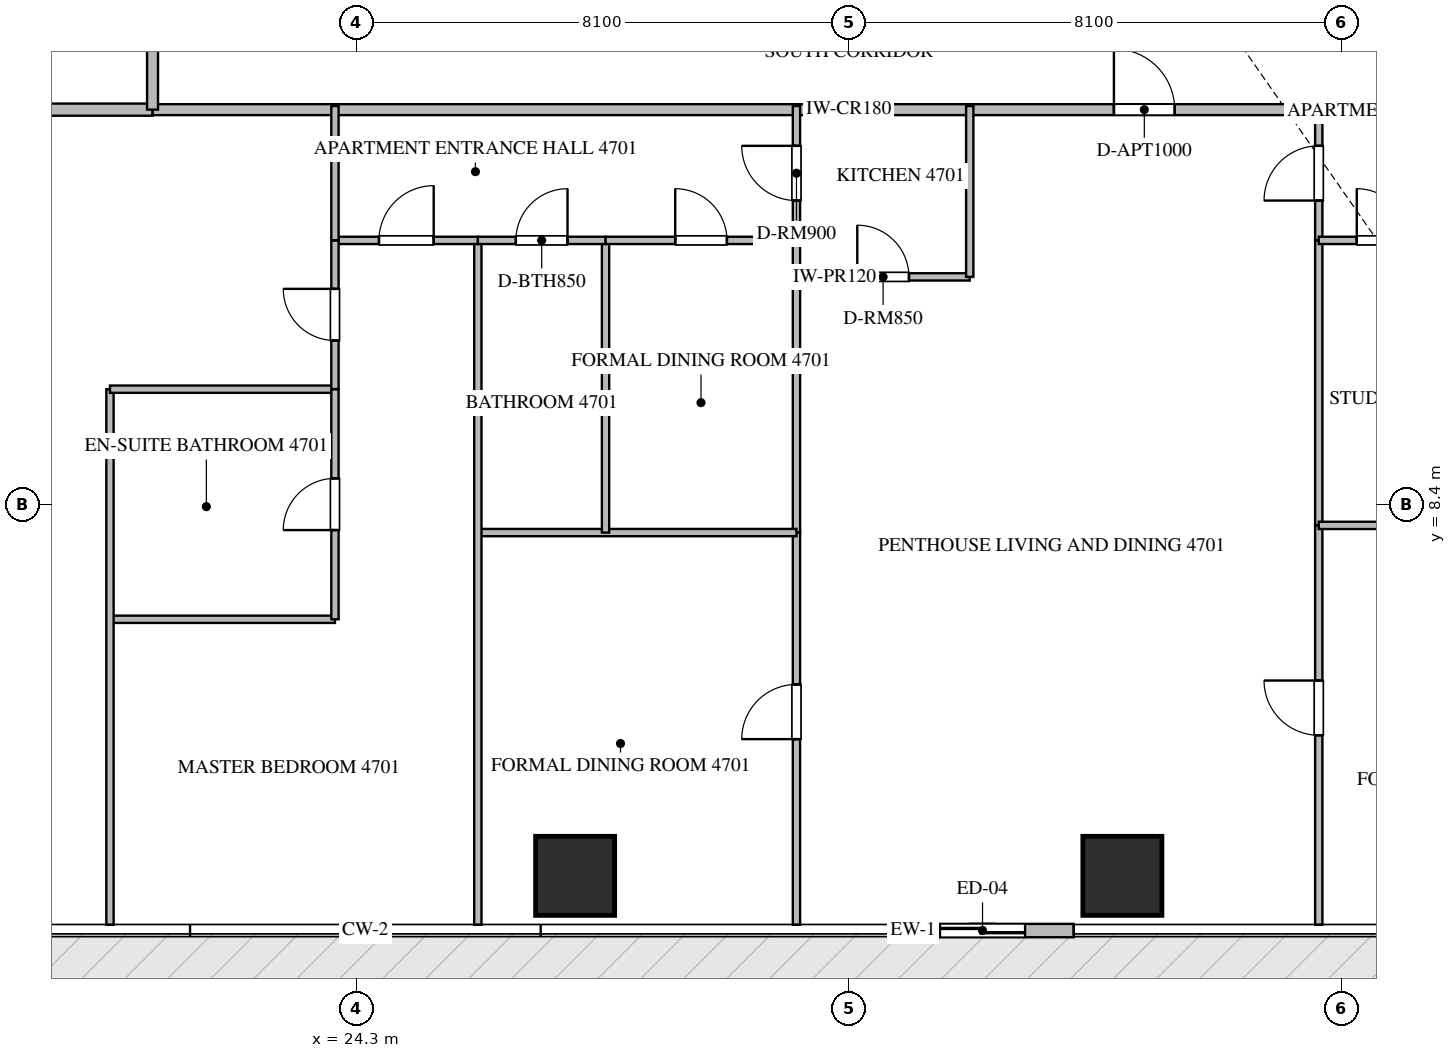
"""IFC4 building model, lengths in metres.
Left out: names, types, materials, properties, quantities, classifications, styles, units other than length and angle.
Written with IfcOpenShell. Run it as: python <this file> out.ifc"""

import sys

from ifc_helpers import new_model, si_unit, direction, frame, frame_2d, origin, origin_2d, place, context, subcontext, project, spatial, rectangle, extrude, source, transform, mapped, element, fill, save


model = new_model("IFC4")
c1 = context("Model", 3, precision=1e-05, world=origin(), true_north=direction((0.0, 1.0)))
c2 = subcontext(c1, "Body", "Model", "MODEL_VIEW")
j1 = project(units=[si_unit("LENGTHUNIT", "METRE"), si_unit("PLANEANGLEUNIT", "RADIAN")], contexts=[c1])
p1 = place(None, origin())
s1 = spatial("IfcSite", under=j1, at=p1, CompositionType="ELEMENT")
p2 = place(p1, origin())
s2 = spatial("IfcBuilding", under=s1, at=p2, CompositionType="ELEMENT")
p3 = place(p2, frame((0.0, 0.0, 187.65)))
s3 = spatial("IfcBuildingStorey", under=s2, at=p3, CompositionType="ELEMENT", Elevation=187.65)
m1 = source(origin(), c2, "Body", "SweptSolid", [
    extrude(rectangle(XDim=1.3, YDim=1.3, at=origin_2d()), origin(), (0.0, 0.0, 1.0), 3.75),
])
for number, where, z_axis, x_axis in (
    (1, (27.9, 2.3, -0.26), (0.0, 0.0, 1.0), (1.0, 0.0, 0.0)),
    (2, (36.9, 2.3, -0.26), (0.0, 0.0, 1.0), (1.0, 0.0, 0.0)),
):
    element("IfcColumn", number, at=place(p3, frame(where, z_axis=z_axis, x_axis=x_axis)), inside=s3, PredefinedType="COLUMN", context=c2, shape_type="MappedRepresentation", body=[
        mapped(m1, transform((0.0, 0.0, 0.0), scale=1.0)),
    ])
p4 = place(p3, frame((33.1, 1.4, 0.0), z_axis=(0.0, 0.0, 1.0), x_axis=(1.0, 0.0, 0.0)))
e3 = element("IfcWall", 3, at=p4, inside=s3, PredefinedType="ELEMENTEDWALL", context=c2, shape_type="SweptSolid", body=[
    extrude(rectangle(XDim=3.0, YDim=0.22, at=frame_2d((1.5, 0.0))), origin(), (0.0, 0.0, 1.0), 3.475),
])
p5 = place(p4, frame((0.8, 0.0, 0.0)))
e4 = element("IfcOpeningElement", 4, at=p5, cuts=e3, PredefinedType="OPENING", context=c2, shape_type="SweptSolid", body=[
    extrude(rectangle(XDim=1.4, YDim=2.25, at=frame_2d((0.7, 1.125))), frame((0.0, 0.12, 0.0), z_axis=(0.0, -1.0, 0.0), x_axis=(1.0, 0.0, 0.0)), (0.0, 0.0, 1.0), 0.24),
])
p6 = place(p3, frame((7.882, 14.9, 0.0), z_axis=(0.0, 0.0, 1.0), x_axis=(1.0, 0.0, 0.0)))
e5 = element("IfcWall", 5, at=p6, inside=s3, PredefinedType="PARTITIONING", context=c2, shape_type="SweptSolid", body=[
    extrude(rectangle(XDim=13.068, YDim=0.2, at=frame_2d((6.534, 0.0))), origin(), (0.0, 0.0, 1.0), 3.49),
])
p7 = place(p3, frame((20.952, 14.9, 0.0), z_axis=(0.0, 0.0, 1.0), x_axis=(1.0, 0.0, 0.0)))
e6 = element("IfcWall", 6, at=p7, inside=s3, PredefinedType="PARTITIONING", context=c2, shape_type="SweptSolid", body=[
    extrude(rectangle(XDim=22.896, YDim=0.18, at=frame_2d((11.448, 0.0))), origin(), (0.0, 0.0, 1.0), 3.49),
])
p8 = place(p7, frame((15.809, 0.0, 0.0)))
e7 = element("IfcOpeningElement", 7, at=p8, cuts=e6, PredefinedType="OPENING", context=c2, shape_type="SweptSolid", body=[
    extrude(rectangle(XDim=1.0, YDim=2.15, at=frame_2d((0.5, 1.075))), frame((0.0, 0.1, 0.0), z_axis=(0.0, -1.0, 0.0), x_axis=(1.0, 0.0, 0.0)), (0.0, 0.0, 1.0), 0.2),
])
p9 = place(p3, frame((20.95, 14.9, 0.0), z_axis=(0.0, 0.0, 1.0), x_axis=(0.0, 1.0, 0.0)))
e8 = element("IfcWall", 8, at=p9, inside=s3, PredefinedType="PARTITIONING", context=c2, shape_type="SweptSolid", body=[
    extrude(rectangle(XDim=18.7, YDim=0.18, at=frame_2d((9.35, 0.0))), origin(), (0.0, 0.0, 1.0), 3.49),
])
p10 = place(p9, frame((1.805, 0.0, 0.0)))
e9 = element("IfcOpeningElement", 9, at=p10, cuts=e8, PredefinedType="OPENING", context=c2, shape_type="SweptSolid", body=[
    extrude(rectangle(XDim=1.0, YDim=2.15, at=frame_2d((0.5, 1.075))), frame((0.0, 0.1, 0.0), z_axis=(0.0, -1.0, 0.0), x_axis=(1.0, 0.0, 0.0)), (0.0, 0.0, 1.0), 0.2),
])
p11 = place(p3, frame((31.54, 12.15, 0.0), z_axis=(0.0, 0.0, 1.0), x_axis=(1.0, 0.0, 0.0)))
e10 = element("IfcWall", 10, at=p11, inside=s3, PredefinedType="PARTITIONING", context=c2, shape_type="SweptSolid", body=[
    extrude(rectangle(XDim=2.85, YDim=0.12, at=frame_2d((1.425, 0.0))), origin(), (0.0, 0.0, 1.0), 3.49),
])
p12 = place(p11, frame((1.0, 0.0, 0.0)))
e11 = element("IfcOpeningElement", 11, at=p12, cuts=e10, PredefinedType="OPENING", context=c2, shape_type="SweptSolid", body=[
    extrude(rectangle(XDim=0.85, YDim=2.1, at=frame_2d((0.425, 1.05))), frame((0.0, 0.07, 0.0), z_axis=(0.0, -1.0, 0.0), x_axis=(1.0, 0.0, 0.0)), (0.0, 0.0, 1.0), 0.14),
])
p13 = place(p3, frame((34.39, 12.15, 0.0), z_axis=(0.0, 0.0, 1.0), x_axis=(0.0, 1.0, 0.0)))
e12 = element("IfcWall", 12, at=p13, inside=s3, PredefinedType="PARTITIONING", context=c2, shape_type="SweptSolid", body=[
    extrude(rectangle(XDim=2.81, YDim=0.12, at=frame_2d((1.405, 0.0))), origin(), (0.0, 0.0, 1.0), 3.49),
])
p14 = place(p3, frame((31.54, 12.75, 0.0), z_axis=(0.0, 0.0, 1.0), x_axis=(0.0, 1.0, 0.0)))
e13 = element("IfcWall", 13, at=p14, inside=s3, PredefinedType="PARTITIONING", context=c2, shape_type="SweptSolid", body=[
    extrude(rectangle(XDim=2.21, YDim=0.12, at=frame_2d((1.105, 0.0))), origin(), (0.0, 0.0, 1.0), 3.49),
])
p15 = place(p14, frame((0.655, 0.0, 0.0)))
e14 = element("IfcOpeningElement", 14, at=p15, cuts=e13, PredefinedType="OPENING", context=c2, shape_type="SweptSolid", body=[
    extrude(rectangle(XDim=0.9, YDim=2.1, at=frame_2d((0.45, 1.05))), frame((0.0, 0.07, 0.0), z_axis=(0.0, -1.0, 0.0), x_axis=(1.0, 0.0, 0.0)), (0.0, 0.0, 1.0), 0.14),
])
p16 = place(p3, frame((31.54, 1.495, 0.0), z_axis=(0.0, 0.0, 1.0), x_axis=(0.0, 1.0, 0.0)))
e15 = element("IfcWall", 15, at=p16, inside=s3, PredefinedType="PARTITIONING", context=c2, shape_type="SweptSolid", body=[
    extrude(rectangle(XDim=6.45, YDim=0.12, at=frame_2d((3.225, 0.0))), origin(), (0.0, 0.0, 1.0), 3.49),
])
p17 = place(p16, frame((3.053, 0.0, 0.0)))
e16 = element("IfcOpeningElement", 16, at=p17, cuts=e15, PredefinedType="OPENING", context=c2, shape_type="SweptSolid", body=[
    extrude(rectangle(XDim=0.9, YDim=2.1, at=frame_2d((0.45, 1.05))), frame((0.0, 0.07, 0.0), z_axis=(0.0, -1.0, 0.0), x_axis=(1.0, 0.0, 0.0)), (0.0, 0.0, 1.0), 0.14),
])
p18 = place(p3, frame((31.54, 7.947, 0.0), z_axis=(0.0, 0.0, 1.0), x_axis=(0.0, 1.0, 0.0)))
e17 = element("IfcWall", 17, at=p18, inside=s3, PredefinedType="PARTITIONING", context=c2, shape_type="SweptSolid", body=[
    extrude(rectangle(XDim=4.801, YDim=0.12, at=frame_2d((2.4, 0.0))), origin(), (0.0, 0.0, 1.0), 3.49),
])
p19 = place(p3, frame((26.3, 7.945, 0.0), z_axis=(0.0, 0.0, 1.0), x_axis=(1.0, 0.0, 0.0)))
e18 = element("IfcWall", 18, at=p19, inside=s3, PredefinedType="PARTITIONING", context=c2, shape_type="SweptSolid", body=[
    extrude(rectangle(XDim=5.24, YDim=0.12, at=frame_2d((2.62, 0.0))), origin(), (0.0, 0.0, 1.0), 3.49),
])
p20 = place(p3, frame((26.3, 1.495, 0.0), z_axis=(0.0, 0.0, 1.0), x_axis=(0.0, 1.0, 0.0)))
e19 = element("IfcWall", 19, at=p20, inside=s3, PredefinedType="PARTITIONING", context=c2, shape_type="SweptSolid", body=[
    extrude(rectangle(XDim=11.255, YDim=0.12, at=frame_2d((5.627, 0.0))), origin(), (0.0, 0.0, 1.0), 3.49),
])
p21 = place(p3, frame((28.4, 7.945, 0.0), z_axis=(0.0, 0.0, 1.0), x_axis=(0.0, 1.0, 0.0)))
e20 = element("IfcWall", 20, at=p21, inside=s3, PredefinedType="PARTITIONING", context=c2, shape_type="SweptSolid", body=[
    extrude(rectangle(XDim=4.805, YDim=0.12, at=frame_2d((2.402, 0.0))), origin(), (0.0, 0.0, 1.0), 3.49),
])
p22 = place(p3, frame((26.3, 12.75, 0.0), z_axis=(0.0, 0.0, 1.0), x_axis=(1.0, 0.0, 0.0)))
e21 = element("IfcWall", 21, at=p22, inside=s3, PredefinedType="PARTITIONING", context=c2, shape_type="SweptSolid", body=[
    extrude(rectangle(XDim=2.1, YDim=0.12, at=frame_2d((1.05, 0.0))), origin(), (0.0, 0.0, 1.0), 3.49),
])
p23 = place(p22, frame((0.625, 0.0, 0.0)))
e22 = element("IfcOpeningElement", 22, at=p23, cuts=e21, PredefinedType="OPENING", context=c2, shape_type="SweptSolid", body=[
    extrude(rectangle(XDim=0.85, YDim=2.1, at=frame_2d((0.425, 1.05))), frame((0.0, 0.07, 0.0), z_axis=(0.0, -1.0, 0.0), x_axis=(1.0, 0.0, 0.0)), (0.0, 0.0, 1.0), 0.14),
])
p24 = place(p3, frame((28.402, 12.75, 0.0), z_axis=(0.0, 0.0, 1.0), x_axis=(1.0, 0.0, 0.0)))
e23 = element("IfcWall", 23, at=p24, inside=s3, PredefinedType="PARTITIONING", context=c2, shape_type="SweptSolid", body=[
    extrude(rectangle(XDim=3.138, YDim=0.12, at=frame_2d((1.569, 0.0))), origin(), (0.0, 0.0, 1.0), 3.49),
])
p25 = place(p24, frame((1.144, 0.0, 0.0)))
e24 = element("IfcOpeningElement", 24, at=p25, cuts=e23, PredefinedType="OPENING", context=c2, shape_type="SweptSolid", body=[
    extrude(rectangle(XDim=0.85, YDim=2.1, at=frame_2d((0.425, 1.05))), frame((0.0, 0.07, 0.0), z_axis=(0.0, -1.0, 0.0), x_axis=(1.0, 0.0, 0.0)), (0.0, 0.0, 1.0), 0.14),
])
p26 = place(p3, frame((23.95, 12.75, 0.0), z_axis=(0.0, 0.0, 1.0), x_axis=(1.0, 0.0, 0.0)))
e25 = element("IfcWall", 25, at=p26, inside=s3, PredefinedType="PARTITIONING", context=c2, shape_type="SweptSolid", body=[
    extrude(rectangle(XDim=2.348, YDim=0.12, at=frame_2d((1.174, 0.0))), origin(), (0.0, 0.0, 1.0), 3.49),
])
p27 = place(p26, frame((0.724, 0.0, 0.0)))
e26 = element("IfcOpeningElement", 26, at=p27, cuts=e25, PredefinedType="OPENING", context=c2, shape_type="SweptSolid", body=[
    extrude(rectangle(XDim=0.9, YDim=2.1, at=frame_2d((0.45, 1.05))), frame((0.0, 0.07, 0.0), z_axis=(0.0, -1.0, 0.0), x_axis=(1.0, 0.0, 0.0)), (0.0, 0.0, 1.0), 0.14),
])
p28 = place(p3, frame((20.25, 6.519, 0.0), z_axis=(0.0, 0.0, 1.0), x_axis=(1.0, 0.0, 0.0)))
e27 = element("IfcWall", 27, at=p28, inside=s3, PredefinedType="PARTITIONING", context=c2, shape_type="SweptSolid", body=[
    extrude(rectangle(XDim=3.7, YDim=0.12, at=frame_2d((1.85, 0.0))), origin(), (0.0, 0.0, 1.0), 3.49),
])
p29 = place(p3, frame((20.25, 1.495, 0.0), z_axis=(0.0, 0.0, 1.0), x_axis=(0.0, 1.0, 0.0)))
e28 = element("IfcWall", 28, at=p29, inside=s3, PredefinedType="PARTITIONING", context=c2, shape_type="SweptSolid", body=[
    extrude(rectangle(XDim=8.808, YDim=0.12, at=frame_2d((4.404, 0.0))), origin(), (0.0, 0.0, 1.0), 3.49),
])
p30 = place(p3, frame((20.25, 10.303, 0.0), z_axis=(0.0, 0.0, 1.0), x_axis=(1.0, 0.0, 0.0)))
e29 = element("IfcWall", 29, at=p30, inside=s3, PredefinedType="PARTITIONING", context=c2, shape_type="SweptSolid", body=[
    extrude(rectangle(XDim=3.7, YDim=0.12, at=frame_2d((1.85, 0.0))), origin(), (0.0, 0.0, 1.0), 2.972),
])
p31 = place(p3, frame((23.95, 6.519, 0.0), z_axis=(0.0, 0.0, 1.0), x_axis=(0.0, 1.0, 0.0)))
e30 = element("IfcWall", 30, at=p31, inside=s3, PredefinedType="PARTITIONING", context=c2, shape_type="SweptSolid", body=[
    extrude(rectangle(XDim=3.784, YDim=0.12, at=frame_2d((1.892, 0.0))), origin(), (0.0, 0.0, 1.0), 3.49),
])
p32 = place(p31, frame((1.467, 0.0, 0.0)))
e31 = element("IfcOpeningElement", 31, at=p32, cuts=e30, PredefinedType="OPENING", context=c2, shape_type="SweptSolid", body=[
    extrude(rectangle(XDim=0.85, YDim=2.1, at=frame_2d((0.425, 1.05))), frame((0.0, 0.07, 0.0), z_axis=(0.0, -1.0, 0.0), x_axis=(1.0, 0.0, 0.0)), (0.0, 0.0, 1.0), 0.14),
])
p33 = place(p3, frame((23.95, 10.305, 0.0), z_axis=(0.0, 0.0, 1.0), x_axis=(0.0, 1.0, 0.0)))
e32 = element("IfcWall", 32, at=p33, inside=s3, PredefinedType="PARTITIONING", context=c2, shape_type="SweptSolid", body=[
    extrude(rectangle(XDim=2.445, YDim=0.12, at=frame_2d((1.223, 0.0))), origin(), (0.0, 0.0, 1.0), 3.49),
])
p34 = place(p33, frame((0.798, 0.0, 0.0)))
e33 = element("IfcOpeningElement", 33, at=p34, cuts=e32, PredefinedType="OPENING", context=c2, shape_type="SweptSolid", body=[
    extrude(rectangle(XDim=0.85, YDim=2.1, at=frame_2d((0.425, 1.05))), frame((0.0, 0.07, 0.0), z_axis=(0.0, -1.0, 0.0), x_axis=(1.0, 0.0, 0.0)), (0.0, 0.0, 1.0), 0.14),
])
p35 = place(p3, frame((23.95, 12.752, 0.0), z_axis=(0.0, 0.0, 1.0), x_axis=(0.0, 1.0, 0.0)))
e34 = element("IfcWall", 34, at=p35, inside=s3, PredefinedType="PARTITIONING", context=c2, shape_type="SweptSolid", body=[
    extrude(rectangle(XDim=2.208, YDim=0.12, at=frame_2d((1.104, 0.0))), origin(), (0.0, 0.0, 1.0), 3.49),
])
p36 = place(p3, frame((40.13, 12.75, 0.0), z_axis=(0.0, 0.0, 1.0), x_axis=(0.0, 1.0, 0.0)))
e35 = element("IfcWall", 35, at=p36, inside=s3, PredefinedType="PARTITIONING", context=c2, shape_type="SweptSolid", body=[
    extrude(rectangle(XDim=2.21, YDim=0.12, at=frame_2d((1.105, 0.0))), origin(), (0.0, 0.0, 1.0), 3.49),
])
p37 = place(p36, frame((0.655, 0.0, 0.0)))
e36 = element("IfcOpeningElement", 36, at=p37, cuts=e35, PredefinedType="OPENING", context=c2, shape_type="SweptSolid", body=[
    extrude(rectangle(XDim=0.9, YDim=2.1, at=frame_2d((0.45, 1.05))), frame((0.0, 0.07, 0.0), z_axis=(0.0, -1.0, 0.0), x_axis=(1.0, 0.0, 0.0)), (0.0, 0.0, 1.0), 0.14),
])
p38 = place(p3, frame((40.13, 1.495, 0.0), z_axis=(0.0, 0.0, 1.0), x_axis=(0.0, 1.0, 0.0)))
e37 = element("IfcWall", 37, at=p38, inside=s3, PredefinedType="PARTITIONING", context=c2, shape_type="SweptSolid", body=[
    extrude(rectangle(XDim=6.568, YDim=0.12, at=frame_2d((3.284, 0.0))), origin(), (0.0, 0.0, 1.0), 3.49),
])
p39 = place(p38, frame((3.117, 0.0, 0.0)))
e38 = element("IfcOpeningElement", 38, at=p39, cuts=e37, PredefinedType="OPENING", context=c2, shape_type="SweptSolid", body=[
    extrude(rectangle(XDim=0.9, YDim=2.1, at=frame_2d((0.45, 1.05))), frame((0.0, 0.07, 0.0), z_axis=(0.0, -1.0, 0.0), x_axis=(1.0, 0.0, 0.0)), (0.0, 0.0, 1.0), 0.14),
])
p40 = place(p3, frame((40.13, 8.065, 0.0), z_axis=(0.0, 0.0, 1.0), x_axis=(0.0, 1.0, 0.0)))
e39 = element("IfcWall", 39, at=p40, inside=s3, PredefinedType="PARTITIONING", context=c2, shape_type="SweptSolid", body=[
    extrude(rectangle(XDim=4.683, YDim=0.12, at=frame_2d((2.342, 0.0))), origin(), (0.0, 0.0, 1.0), 3.49),
])
p41 = place(p3, frame((40.13, 8.063, 0.0), z_axis=(0.0, 0.0, 1.0), x_axis=(1.0, 0.0, 0.0)))
e40 = element("IfcWall", 40, at=p41, inside=s3, PredefinedType="PARTITIONING", context=c2, shape_type="SweptSolid", body=[
    extrude(rectangle(XDim=5.15, YDim=0.12, at=frame_2d((2.575, 0.0))), origin(), (0.0, 0.0, 1.0), 3.49),
])
p42 = place(p3, frame((40.13, 12.75, 0.0), z_axis=(0.0, 0.0, 1.0), x_axis=(1.0, 0.0, 0.0)))
e41 = element("IfcWall", 41, at=p42, inside=s3, PredefinedType="PARTITIONING", context=c2, shape_type="SweptSolid", body=[
    extrude(rectangle(XDim=2.1, YDim=0.12, at=frame_2d((1.05, 0.0))), origin(), (0.0, 0.0, 1.0), 3.49),
])
p43 = place(p42, frame((0.625, 0.0, 0.0)))
e42 = element("IfcOpeningElement", 42, at=p43, cuts=e41, PredefinedType="OPENING", context=c2, shape_type="SweptSolid", body=[
    extrude(rectangle(XDim=0.85, YDim=2.1, at=frame_2d((0.425, 1.05))), frame((0.0, 0.07, 0.0), z_axis=(0.0, -1.0, 0.0), x_axis=(1.0, 0.0, 0.0)), (0.0, 0.0, 1.0), 0.14),
])
m2 = source(origin(), c2, "Body", "SweptSolid", [
    extrude(rectangle(XDim=1.4, YDim=2.25, at=frame_2d((0.7, 1.125))), frame((0.0, 0.025, 0.0), z_axis=(0.0, -1.0, 0.0), x_axis=(1.0, 0.0, 0.0)), (0.0, 0.0, 1.0), 0.05),
])
p44 = place(p5, origin())
e43 = element("IfcDoor", 43, at=p44, inside=s3, OperationType="SLIDING_TO_LEFT", PredefinedType="DOOR", context=c2, shape_type="MappedRepresentation", body=[
    mapped(m2, transform((0.0, 0.0, 0.0), scale=1.0)),
])
fill(e4, e43)
m3 = source(origin(), c2, "Body", "SweptSolid", [
    extrude(rectangle(XDim=1.0, YDim=2.15, at=frame_2d((0.5, 1.075))), frame((0.0, 0.025, 0.0), z_axis=(0.0, -1.0, 0.0), x_axis=(1.0, 0.0, 0.0)), (0.0, 0.0, 1.0), 0.05),
])
p45 = place(p8, origin())
e44 = element("IfcDoor", 44, at=p45, inside=s3, OperationType="SINGLE_SWING_LEFT", PredefinedType="DOOR", context=c2, shape_type="MappedRepresentation", body=[
    mapped(m3, transform((0.0, 0.0, 0.0), scale=1.0)),
])
fill(e7, e44)
m4 = source(origin(), c2, "Body", "SweptSolid", [
    extrude(rectangle(XDim=0.85, YDim=2.1, at=frame_2d((0.425, 1.05))), frame((0.0, 0.025, 0.0), z_axis=(0.0, -1.0, 0.0), x_axis=(1.0, 0.0, 0.0)), (0.0, 0.0, 1.0), 0.05),
])
p46 = place(p12, origin())
e45 = element("IfcDoor", 45, at=p46, inside=s3, OperationType="SINGLE_SWING_LEFT", PredefinedType="DOOR", context=c2, shape_type="MappedRepresentation", body=[
    mapped(m4, transform((0.0, 0.0, 0.0), scale=1.0)),
])
fill(e11, e45)
m5 = source(origin(), c2, "Body", "SweptSolid", [
    extrude(rectangle(XDim=0.9, YDim=2.1, at=frame_2d((0.45, 1.05))), frame((0.0, 0.025, 0.0), z_axis=(0.0, -1.0, 0.0), x_axis=(1.0, 0.0, 0.0)), (0.0, 0.0, 1.0), 0.05),
])
p47 = place(p15, origin())
e46 = element("IfcDoor", 46, at=p47, inside=s3, OperationType="SINGLE_SWING_RIGHT", PredefinedType="DOOR", context=c2, shape_type="MappedRepresentation", body=[
    mapped(m5, transform((0.0, 0.0, 0.0), scale=1.0)),
])
fill(e14, e46)
p48 = place(p17, origin())
e47 = element("IfcDoor", 47, at=p48, inside=s3, OperationType="SINGLE_SWING_LEFT", PredefinedType="DOOR", context=c2, shape_type="MappedRepresentation", body=[
    mapped(m5, transform((0.0, 0.0, 0.0), scale=1.0)),
])
fill(e16, e47)
p49 = place(p23, origin())
e48 = element("IfcDoor", 48, at=p49, inside=s3, OperationType="SINGLE_SWING_RIGHT", PredefinedType="DOOR", context=c2, shape_type="MappedRepresentation", body=[
    mapped(m4, transform((0.0, 0.0, 0.0), scale=1.0)),
])
fill(e22, e48)
p50 = place(p25, origin())
e49 = element("IfcDoor", 49, at=p50, inside=s3, OperationType="SINGLE_SWING_LEFT", PredefinedType="DOOR", context=c2, shape_type="MappedRepresentation", body=[
    mapped(m4, transform((0.0, 0.0, 0.0), scale=1.0)),
])
fill(e24, e49)
p51 = place(p27, origin())
e50 = element("IfcDoor", 50, at=p51, inside=s3, OperationType="SINGLE_SWING_RIGHT", PredefinedType="DOOR", context=c2, shape_type="MappedRepresentation", body=[
    mapped(m5, transform((0.0, 0.0, 0.0), scale=1.0)),
])
fill(e26, e50)
p52 = place(p32, origin())
e51 = element("IfcDoor", 51, at=p52, inside=s3, OperationType="SINGLE_SWING_LEFT", PredefinedType="DOOR", context=c2, shape_type="MappedRepresentation", body=[
    mapped(m4, transform((0.0, 0.0, 0.0), scale=1.0)),
])
fill(e31, e51)
p53 = place(p34, origin())
e52 = element("IfcDoor", 52, at=p53, inside=s3, OperationType="SINGLE_SWING_RIGHT", PredefinedType="DOOR", context=c2, shape_type="MappedRepresentation", body=[
    mapped(m4, transform((0.0, 0.0, 0.0), scale=1.0)),
])
fill(e33, e52)
p54 = place(p37, origin())
e53 = element("IfcDoor", 53, at=p54, inside=s3, OperationType="SINGLE_SWING_LEFT", PredefinedType="DOOR", context=c2, shape_type="MappedRepresentation", body=[
    mapped(m5, transform((0.0, 0.0, 0.0), scale=1.0)),
])
fill(e36, e53)
p55 = place(p39, origin())
e54 = element("IfcDoor", 54, at=p55, inside=s3, OperationType="SINGLE_SWING_RIGHT", PredefinedType="DOOR", context=c2, shape_type="MappedRepresentation", body=[
    mapped(m5, transform((0.0, 0.0, 0.0), scale=1.0)),
])
fill(e38, e54)
p56 = place(p43, origin())
e55 = element("IfcDoor", 55, at=p56, inside=s3, OperationType="SINGLE_SWING_LEFT", PredefinedType="DOOR", context=c2, shape_type="MappedRepresentation", body=[
    mapped(m4, transform((0.0, 0.0, 0.0), scale=1.0)),
])
fill(e42, e55)
save(model, sys.argv[1])
